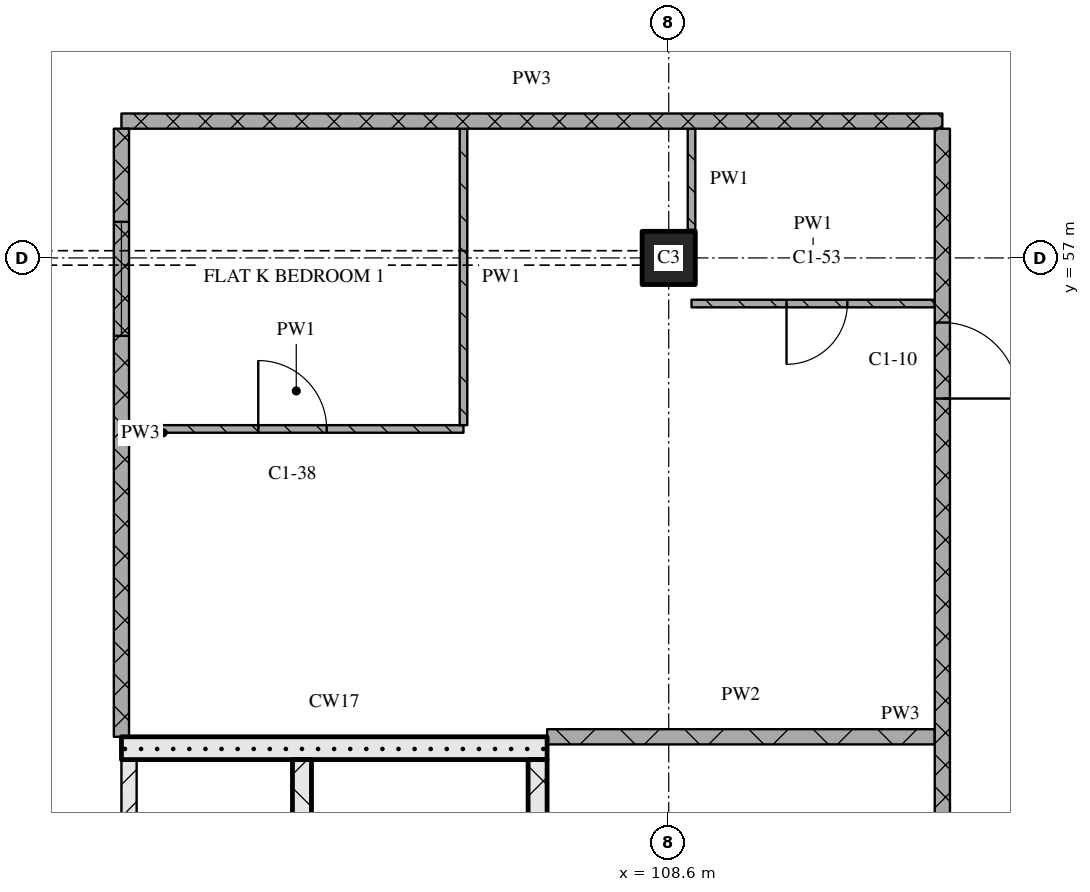
"""IFC4 building model, lengths in metres.
Left out: names, types, materials, properties, quantities, classifications, styles, units other than length and angle.
Written with IfcOpenShell. Run it as: python <this file> out.ifc"""

import sys

from ifc_helpers import new_model, si_unit, direction, frame, frame_2d, origin, origin_2d, place, context, subcontext, project, spatial, rectangle, extrude, element, fill, save


model = new_model("IFC4")
c1 = context("Model", 3, precision=1e-05, world=origin(), true_north=direction((0.0, 1.0)))
c2 = subcontext(c1, "Body", "Model", "MODEL_VIEW")
j1 = project(units=[si_unit("LENGTHUNIT", "METRE"), si_unit("PLANEANGLEUNIT", "RADIAN")], contexts=[c1])
p1 = place(None, origin())
s1 = spatial("IfcSite", under=j1, at=p1, CompositionType="ELEMENT")
p2 = place(p1, origin())
s2 = spatial("IfcBuilding", under=s1, at=p2, CompositionType="ELEMENT")
p3 = place(p2, frame((0.0, 0.0, 154.65)))
s3 = spatial("IfcBuildingStorey", under=s2, at=p3, CompositionType="ELEMENT", Elevation=154.65)
p4 = place(p3, frame((108.6, 57.0, 0.0), z_axis=(0.0, 0.0, 1.0), x_axis=(1.0, 0.0, 0.0)))
e1 = element("IfcColumn", 1, at=p4, inside=s3, PredefinedType="COLUMN", context=c2, shape_type="SweptSolid", body=[
    extrude(rectangle(XDim=0.7, YDim=0.7, at=origin_2d()), origin(), (0.0, 0.0, 1.0), 3.6),
])
p5 = place(p3, frame((101.5, 43.5, 0.0), z_axis=(0.0, 0.0, 1.0), x_axis=(0.0, 1.0, 0.0)))
e2 = element("IfcWall", 2, at=p5, inside=s3, PredefinedType="PARTITIONING", context=c2, shape_type="SweptSolid", body=[
    extrude(rectangle(XDim=6.9, YDim=0.2, at=frame_2d((3.45, 0.0))), origin(), (0.0, 0.0, 1.0), 3.32),
])
p6 = place(p5, frame((1.0, 0.0, 0.0)))
e3 = element("IfcOpeningElement", 3, at=p6, cuts=e2, PredefinedType="OPENING", context=c2, shape_type="SweptSolid", body=[
    extrude(rectangle(XDim=1.0, YDim=2.1, at=frame_2d((0.5, 1.05))), frame((0.0, 0.11, 0.0), z_axis=(0.0, -1.0, 0.0), x_axis=(1.0, 0.0, 0.0)), (0.0, 0.0, 1.0), 0.22),
])
p7 = place(p3, frame((103.775, 43.5, 0.0), z_axis=(0.0, 0.0, 1.0), x_axis=(0.0, 1.0, 0.0)))
e4 = element("IfcWall", 4, at=p7, inside=s3, PredefinedType="SOLIDWALL", context=c2, shape_type="SweptSolid", body=[
    extrude(rectangle(XDim=6.9, YDim=0.25, at=frame_2d((3.45, 0.0))), origin(), (0.0, 0.0, 1.0), 3.32),
])
p8 = place(p7, frame((0.2, 0.0, 0.0)))
e5 = element("IfcOpeningElement", 5, at=p8, cuts=e4, PredefinedType="OPENING", context=c2, shape_type="SweptSolid", body=[
    extrude(rectangle(XDim=1.0, YDim=2.1, at=frame_2d((0.5, 1.05))), frame((0.0, 0.135, 0.0), z_axis=(0.0, -1.0, 0.0), x_axis=(1.0, 0.0, 0.0)), (0.0, 0.0, 1.0), 0.27),
])
p9 = place(p3, frame((106.875, 43.5, 0.0), z_axis=(0.0, 0.0, 1.0), x_axis=(0.0, 1.0, 0.0)))
e6 = element("IfcWall", 6, at=p9, inside=s3, PredefinedType="SOLIDWALL", context=c2, shape_type="SweptSolid", body=[
    extrude(rectangle(XDim=6.9, YDim=0.25, at=frame_2d((3.45, 0.0))), origin(), (0.0, 0.0, 1.0), 3.32),
])
p10 = place(p3, frame((101.4, 50.55, 0.0), z_axis=(0.0, 0.0, 1.0), x_axis=(1.0, 0.0, 0.0)))
e7 = element("IfcWall", 7, at=p10, inside=s3, PredefinedType="SOLIDWALL", context=c2, shape_type="SweptSolid", body=[
    extrude(rectangle(XDim=5.6, YDim=0.3, at=frame_2d((2.8, 0.0))), origin(), (0.0, 0.0, 1.0), 3.32),
])
p11 = place(p3, frame((107.0, 50.7, 0.0), z_axis=(0.0, 0.0, 1.0), x_axis=(1.0, 0.0, 0.0)))
e8 = element("IfcWall", 8, at=p11, inside=s3, PredefinedType="PARTITIONING", context=c2, shape_type="SweptSolid", body=[
    extrude(rectangle(XDim=5.1, YDim=0.2, at=frame_2d((2.55, 0.0))), origin(), (0.0, 0.0, 1.0), 3.32),
])
p12 = place(p3, frame((101.5, 54.75, 0.0), z_axis=(0.0, 0.0, 1.0), x_axis=(1.0, 0.0, 0.0)))
e9 = element("IfcWall", 9, at=p12, inside=s3, PredefinedType="PARTITIONING", context=c2, shape_type="SweptSolid", body=[
    extrude(rectangle(XDim=4.4, YDim=0.1, at=frame_2d((2.2, 0.0))), origin(), (0.0, 0.0, 1.0), 3.32),
])
p13 = place(p12, frame((1.7, 0.0, 0.0)))
e10 = element("IfcOpeningElement", 10, at=p13, cuts=e9, PredefinedType="OPENING", context=c2, shape_type="SweptSolid", body=[
    extrude(rectangle(XDim=0.9, YDim=2.1, at=frame_2d((0.45, 1.05))), frame((0.0, 0.06, 0.0), z_axis=(0.0, -1.0, 0.0), x_axis=(1.0, 0.0, 0.0)), (0.0, 0.0, 1.0), 0.12),
])
p14 = place(p3, frame((108.9, 56.4, 0.0), z_axis=(0.0, 0.0, 1.0), x_axis=(1.0, 0.0, 0.0)))
e11 = element("IfcWall", 11, at=p14, inside=s3, PredefinedType="PARTITIONING", context=c2, shape_type="SweptSolid", body=[
    extrude(rectangle(XDim=3.2, YDim=0.1, at=frame_2d((1.6, 0.0))), origin(), (0.0, 0.0, 1.0), 3.32),
])
p15 = place(p14, frame((1.25, 0.0, 0.0)))
e12 = element("IfcOpeningElement", 12, at=p15, cuts=e11, PredefinedType="OPENING", context=c2, shape_type="SweptSolid", body=[
    extrude(rectangle(XDim=0.8, YDim=2.1, at=frame_2d((0.4, 1.05))), frame((0.0, 0.06, 0.0), z_axis=(0.0, -1.0, 0.0), x_axis=(1.0, 0.0, 0.0)), (0.0, 0.0, 1.0), 0.12),
])
p16 = place(p3, frame((101.4, 58.8, 0.0), z_axis=(0.0, 0.0, 1.0), x_axis=(1.0, 0.0, 0.0)))
e13 = element("IfcWall", 13, at=p16, inside=s3, PredefinedType="PARTITIONING", context=c2, shape_type="SweptSolid", body=[
    extrude(rectangle(XDim=10.8, YDim=0.2, at=frame_2d((5.4, 0.0))), origin(), (0.0, 0.0, 1.0), 3.32),
])
p17 = place(p3, frame((101.4, 58.7, 0.0), z_axis=(0.0, 0.0, 1.0), x_axis=(0.0, -1.0, 0.0)))
e14 = element("IfcWall", 14, at=p17, inside=s3, PredefinedType="PARTITIONING", context=c2, shape_type="SweptSolid", body=[
    extrude(rectangle(XDim=8.0, YDim=0.2, at=frame_2d((4.0, 0.0))), origin(), (0.0, 0.0, 1.0), 3.32),
])
p18 = place(p17, frame((1.225, 0.0, 0.9)))
e15 = element("IfcOpeningElement", 15, at=p18, cuts=e14, PredefinedType="OPENING", context=c2, shape_type="SweptSolid", body=[
    extrude(rectangle(XDim=1.5, YDim=1.5, at=frame_2d((0.75, 0.75))), frame((0.0, 0.11, 0.0), z_axis=(0.0, -1.0, 0.0), x_axis=(1.0, 0.0, 0.0)), (0.0, 0.0, 1.0), 0.22),
])
p19 = place(p3, frame((105.9, 58.7, 0.0), z_axis=(0.0, 0.0, 1.0), x_axis=(0.0, -1.0, 0.0)))
e16 = element("IfcWall", 16, at=p19, inside=s3, PredefinedType="PARTITIONING", context=c2, shape_type="SweptSolid", body=[
    extrude(rectangle(XDim=3.9, YDim=0.1, at=frame_2d((1.95, 0.0))), origin(), (0.0, 0.0, 1.0), 3.32),
])
p20 = place(p3, frame((108.9, 58.7, 0.0), z_axis=(0.0, 0.0, 1.0), x_axis=(0.0, -1.0, 0.0)))
e17 = element("IfcWall", 17, at=p20, inside=s3, PredefinedType="PARTITIONING", context=c2, shape_type="SweptSolid", body=[
    extrude(rectangle(XDim=1.33, YDim=0.1, at=frame_2d((0.665, 0.0))), origin(), (0.0, 0.0, 1.0), 3.32),
])
p21 = place(p3, frame((112.2, 43.3, 0.0), z_axis=(0.0, 0.0, 1.0), x_axis=(0.0, 1.0, 0.0)))
e18 = element("IfcWall", 18, at=p21, inside=s3, PredefinedType="PARTITIONING", context=c2, shape_type="SweptSolid", body=[
    extrude(rectangle(XDim=15.4, YDim=0.2, at=frame_2d((7.7, 0.0))), origin(), (0.0, 0.0, 1.0), 3.32),
])
p22 = place(p21, frame((11.85, 0.0, 0.0)))
e19 = element("IfcOpeningElement", 19, at=p22, cuts=e18, PredefinedType="OPENING", context=c2, shape_type="SweptSolid", body=[
    extrude(rectangle(XDim=1.0, YDim=2.1, at=frame_2d((0.5, 1.05))), frame((0.0, 0.11, 0.0), z_axis=(0.0, -1.0, 0.0), x_axis=(1.0, 0.0, 0.0)), (0.0, 0.0, 1.0), 0.22),
])
p23 = place(p13, origin())
e20 = element("IfcDoor", 20, at=p23, inside=s3, OperationType="SINGLE_SWING_LEFT", PredefinedType="DOOR", context=c2, shape_type="SweptSolid", body=[
    extrude(rectangle(XDim=0.9, YDim=2.1, at=frame_2d((0.45, 1.05))), frame((0.0, 0.025, 0.0), z_axis=(0.0, -1.0, 0.0), x_axis=(1.0, 0.0, 0.0)), (0.0, 0.0, 1.0), 0.05),
])
fill(e10, e20)
p24 = place(p15, origin())
e21 = element("IfcDoor", 21, at=p24, inside=s3, OperationType="SINGLE_SWING_RIGHT", PredefinedType="DOOR", context=c2, shape_type="SweptSolid", body=[
    extrude(rectangle(XDim=0.8, YDim=2.1, at=frame_2d((0.4, 1.05))), frame((0.0, 0.025, 0.0), z_axis=(0.0, -1.0, 0.0), x_axis=(1.0, 0.0, 0.0)), (0.0, 0.0, 1.0), 0.05),
])
fill(e12, e21)
p25 = place(p22, origin())
e22 = element("IfcDoor", 22, at=p25, inside=s3, OperationType="SINGLE_SWING_RIGHT", PredefinedType="DOOR", context=c2, shape_type="SweptSolid", body=[
    extrude(rectangle(XDim=1.0, YDim=2.1, at=frame_2d((0.5, 1.05))), frame((0.0, 0.025, 0.0), z_axis=(0.0, -1.0, 0.0), x_axis=(1.0, 0.0, 0.0)), (0.0, 0.0, 1.0), 0.05),
])
fill(e19, e22)
p26 = place(p18, origin())
e23 = element("IfcWindow", 23, at=p26, inside=s3, PartitioningType="SINGLE_PANEL", PredefinedType="WINDOW", context=c2, shape_type="SweptSolid", body=[
    extrude(rectangle(XDim=1.5, YDim=1.5, at=frame_2d((0.75, 0.75))), frame((0.0, 0.03, 0.0), z_axis=(0.0, -1.0, 0.0), x_axis=(1.0, 0.0, 0.0)), (0.0, 0.0, 1.0), 0.06),
])
fill(e15, e23)
save(model, sys.argv[1])
